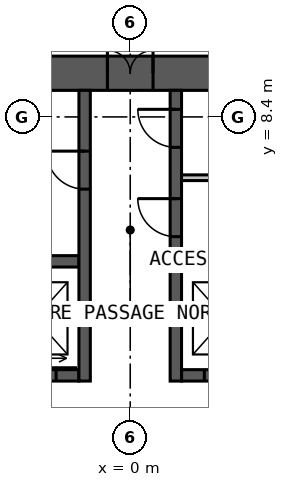
"""IFC4 building model, lengths in metres.
Left out: names, types, materials, properties, quantities, classifications, styles, units other than length and angle.
Written with IfcOpenShell. Run it as: python <this file> out.ifc"""

import sys

from ifc_helpers import new_model, si_unit, direction, frame, frame_2d, origin, place, context, subcontext, project, spatial, rectangle, extrude, element, fill, save


model = new_model("IFC4")
c1 = context("Model", 3, precision=1e-05, world=origin(), true_north=direction((0.0, 1.0)))
c2 = subcontext(c1, "Body", "Model", "MODEL_VIEW")
j1 = project(units=[si_unit("LENGTHUNIT", "METRE"), si_unit("PLANEANGLEUNIT", "RADIAN")], contexts=[c1])
p1 = place(None, origin())
s1 = spatial("IfcSite", under=j1, at=p1, CompositionType="ELEMENT")
p2 = place(p1, origin())
s2 = spatial("IfcBuilding", under=s1, at=p2, CompositionType="ELEMENT")
p3 = place(p2, frame((0.0, 0.0, 16.0)))
s3 = spatial("IfcBuildingStorey", under=s2, at=p3, CompositionType="ELEMENT", Elevation=16.0)
p4 = place(p3, frame((-10.0, 9.55, 0.0), z_axis=(0.0, 0.0, 1.0), x_axis=(1.0, 0.0, 0.0)))
e1 = element("IfcWall", 1, at=p4, inside=s3, PredefinedType="SOLIDWALL", context=c2, shape_type="SweptSolid", body=[
    extrude(rectangle(XDim=20.0, YDim=0.9, at=frame_2d((10.0, 0.0))), origin(), (0.0, 0.0, 1.0), 5.0),
])
p5 = place(p4, frame((9.4, 0.0, 0.0)))
e2 = element("IfcOpeningElement", 2, at=p5, cuts=e1, PredefinedType="OPENING", context=c2, shape_type="SweptSolid", body=[
    extrude(rectangle(XDim=1.2, YDim=2.2, at=frame_2d((0.6, 1.1))), frame((0.0, 0.46, 0.0), z_axis=(0.0, -1.0, 0.0), x_axis=(1.0, 0.0, 0.0)), (0.0, 0.0, 1.0), 0.92),
])
p6 = place(p3, frame((-6.2, 1.6, 0.0), z_axis=(0.0, 0.0, 1.0), x_axis=(1.0, 0.0, 0.0)))
e3 = element("IfcWall", 3, at=p6, inside=s3, PredefinedType="SOLIDWALL", context=c2, shape_type="SweptSolid", body=[
    extrude(rectangle(XDim=4.85, YDim=0.3, at=frame_2d((2.425, 0.0))), origin(), (0.0, 0.0, 1.0), 5.0),
])
p7 = place(p6, frame((0.625, 0.0, 0.0)))
e4 = element("IfcOpeningElement", 4, at=p7, cuts=e3, PredefinedType="OPENING", context=c2, shape_type="SweptSolid", body=[
    extrude(rectangle(XDim=1.1, YDim=2.2, at=frame_2d((0.55, 1.1))), frame((0.0, 0.16, 0.0), z_axis=(0.0, -1.0, 0.0), x_axis=(1.0, 0.0, 0.0)), (0.0, 0.0, 1.0), 0.32),
])
p8 = place(p6, frame((3.15, 0.0, 0.0)))
e5 = element("IfcOpeningElement", 5, at=p8, cuts=e3, PredefinedType="OPENING", context=c2, shape_type="SweptSolid", body=[
    extrude(rectangle(XDim=1.1, YDim=2.2, at=frame_2d((0.55, 1.1))), frame((0.0, 0.16, 0.0), z_axis=(0.0, -1.0, 0.0), x_axis=(1.0, 0.0, 0.0)), (0.0, 0.0, 1.0), 0.32),
])
p9 = place(p3, frame((1.35, 1.6, 0.0), z_axis=(0.0, 0.0, 1.0), x_axis=(1.0, 0.0, 0.0)))
e6 = element("IfcWall", 6, at=p9, inside=s3, PredefinedType="SOLIDWALL", context=c2, shape_type="SweptSolid", body=[
    extrude(rectangle(XDim=4.85, YDim=0.3, at=frame_2d((2.425, 0.0))), origin(), (0.0, 0.0, 1.0), 5.0),
])
p10 = place(p9, frame((0.6, 0.0, 0.0)))
e7 = element("IfcOpeningElement", 7, at=p10, cuts=e6, PredefinedType="OPENING", context=c2, shape_type="SweptSolid", body=[
    extrude(rectangle(XDim=1.1, YDim=2.2, at=frame_2d((0.55, 1.1))), frame((0.0, 0.16, 0.0), z_axis=(0.0, -1.0, 0.0), x_axis=(1.0, 0.0, 0.0)), (0.0, 0.0, 1.0), 0.32),
])
p11 = place(p9, frame((3.125, 0.0, 0.0)))
e8 = element("IfcOpeningElement", 8, at=p11, cuts=e6, PredefinedType="OPENING", context=c2, shape_type="SweptSolid", body=[
    extrude(rectangle(XDim=1.1, YDim=2.2, at=frame_2d((0.55, 1.1))), frame((0.0, 0.16, 0.0), z_axis=(0.0, -1.0, 0.0), x_axis=(1.0, 0.0, 0.0)), (0.0, 0.0, 1.0), 0.32),
])
for number, where, z_axis, x_axis in (
    (9, (-6.2, 4.6, 0.0), (0.0, 0.0, 1.0), (1.0, 0.0, 0.0)),
    (10, (1.35, 4.6, 0.0), (0.0, 0.0, 1.0), (1.0, 0.0, 0.0)),
):
    element("IfcWall", number, at=place(p3, frame(where, z_axis=z_axis, x_axis=x_axis)), inside=s3, PredefinedType="SOLIDWALL", context=c2, shape_type="SweptSolid", body=[
        extrude(rectangle(XDim=4.85, YDim=0.3, at=frame_2d((2.425, 0.0))), origin(), (0.0, 0.0, 1.0), 5.0),
    ])
p12 = place(p3, frame((-1.2, 1.45, 0.0), z_axis=(0.0, 0.0, 1.0), x_axis=(0.0, 1.0, 0.0)))
e11 = element("IfcWall", 11, at=p12, inside=s3, PredefinedType="SOLIDWALL", context=c2, shape_type="SweptSolid", body=[
    extrude(rectangle(XDim=7.65, YDim=0.3, at=frame_2d((3.825, 0.0))), origin(), (0.0, 0.0, 1.0), 5.0),
])
p13 = place(p12, frame((5.05, 0.0, 0.0)))
e12 = element("IfcOpeningElement", 12, at=p13, cuts=e11, PredefinedType="OPENING", context=c2, shape_type="SweptSolid", body=[
    extrude(rectangle(XDim=1.0, YDim=2.2, at=frame_2d((0.5, 1.1))), frame((0.0, 0.16, 0.0), z_axis=(0.0, -1.0, 0.0), x_axis=(1.0, 0.0, 0.0)), (0.0, 0.0, 1.0), 0.32),
])
p14 = place(p3, frame((1.2, 1.45, 0.0), z_axis=(0.0, 0.0, 1.0), x_axis=(0.0, 1.0, 0.0)))
e13 = element("IfcWall", 13, at=p14, inside=s3, PredefinedType="SOLIDWALL", context=c2, shape_type="SweptSolid", body=[
    extrude(rectangle(XDim=7.65, YDim=0.3, at=frame_2d((3.825, 0.0))), origin(), (0.0, 0.0, 1.0), 5.0),
])
p15 = place(p14, frame((3.8, 0.0, 0.0)))
e14 = element("IfcOpeningElement", 14, at=p15, cuts=e13, PredefinedType="OPENING", context=c2, shape_type="SweptSolid", body=[
    extrude(rectangle(XDim=1.0, YDim=2.2, at=frame_2d((0.5, 1.1))), frame((0.0, 0.16, 0.0), z_axis=(0.0, -1.0, 0.0), x_axis=(1.0, 0.0, 0.0)), (0.0, 0.0, 1.0), 0.32),
])
p16 = place(p14, frame((6.15, 0.0, 0.0)))
e15 = element("IfcOpeningElement", 15, at=p16, cuts=e13, PredefinedType="OPENING", context=c2, shape_type="SweptSolid", body=[
    extrude(rectangle(XDim=1.0, YDim=2.2, at=frame_2d((0.5, 1.1))), frame((0.0, 0.16, 0.0), z_axis=(0.0, -1.0, 0.0), x_axis=(1.0, 0.0, 0.0)), (0.0, 0.0, 1.0), 0.32),
])
p17 = place(p3, frame((1.35, 6.8, 0.0), z_axis=(0.0, 0.0, 1.0), x_axis=(1.0, 0.0, 0.0)))
e16 = element("IfcWall", 16, at=p17, inside=s3, PredefinedType="PARTITIONING", context=c2, shape_type="SweptSolid", body=[
    extrude(rectangle(XDim=4.85, YDim=0.15, at=frame_2d((2.425, 0.0))), origin(), (0.0, 0.0, 1.0), 4.75),
])
p18 = place(p17, frame((3.15, 0.0, 0.0)))
e17 = element("IfcOpeningElement", 17, at=p18, cuts=e16, PredefinedType="OPENING", context=c2, shape_type="SweptSolid", body=[
    extrude(rectangle(XDim=0.9, YDim=2.2, at=frame_2d((0.45, 1.1))), frame((0.0, 0.085, 0.0), z_axis=(0.0, -1.0, 0.0), x_axis=(1.0, 0.0, 0.0)), (0.0, 0.0, 1.0), 0.17),
])
p19 = place(p5, origin())
e18 = element("IfcDoor", 18, at=p19, inside=s3, OperationType="DOUBLE_DOOR_SINGLE_SWING", PredefinedType="DOOR", context=c2, shape_type="SweptSolid", body=[
    extrude(rectangle(XDim=1.2, YDim=2.2, at=frame_2d((0.6, 1.1))), frame((0.0, 0.025, 0.0), z_axis=(0.0, -1.0, 0.0), x_axis=(1.0, 0.0, 0.0)), (0.0, 0.0, 1.0), 0.05),
])
fill(e2, e18)
p20 = place(p13, origin())
e19 = element("IfcDoor", 19, at=p20, inside=s3, OperationType="SINGLE_SWING_RIGHT", PredefinedType="DOOR", context=c2, shape_type="SweptSolid", body=[
    extrude(rectangle(XDim=1.0, YDim=2.2, at=frame_2d((0.5, 1.1))), frame((0.0, 0.025, 0.0), z_axis=(0.0, -1.0, 0.0), x_axis=(1.0, 0.0, 0.0)), (0.0, 0.0, 1.0), 0.05),
])
fill(e12, e19)
p21 = place(p15, origin())
e20 = element("IfcDoor", 20, at=p21, inside=s3, OperationType="SINGLE_SWING_RIGHT", PredefinedType="DOOR", context=c2, shape_type="SweptSolid", body=[
    extrude(rectangle(XDim=1.0, YDim=2.2, at=frame_2d((0.5, 1.1))), frame((0.0, 0.025, 0.0), z_axis=(0.0, -1.0, 0.0), x_axis=(1.0, 0.0, 0.0)), (0.0, 0.0, 1.0), 0.05),
])
fill(e14, e20)
p22 = place(p16, origin())
e21 = element("IfcDoor", 21, at=p22, inside=s3, OperationType="SINGLE_SWING_RIGHT", PredefinedType="DOOR", context=c2, shape_type="SweptSolid", body=[
    extrude(rectangle(XDim=1.0, YDim=2.2, at=frame_2d((0.5, 1.1))), frame((0.0, 0.025, 0.0), z_axis=(0.0, -1.0, 0.0), x_axis=(1.0, 0.0, 0.0)), (0.0, 0.0, 1.0), 0.05),
])
fill(e15, e21)
p23 = place(p8, origin())
e22 = element("IfcDoor", 22, at=p23, inside=s3, OperationType="SLIDING_TO_LEFT", PredefinedType="DOOR", context=c2, shape_type="SweptSolid", body=[
    extrude(rectangle(XDim=1.1, YDim=2.2, at=frame_2d((0.55, 1.1))), frame((0.0, 0.025, 0.0), z_axis=(0.0, -1.0, 0.0), x_axis=(1.0, 0.0, 0.0)), (0.0, 0.0, 1.0), 0.05),
])
fill(e5, e22)
p24 = place(p10, origin())
e23 = element("IfcDoor", 23, at=p24, inside=s3, OperationType="SLIDING_TO_LEFT", PredefinedType="DOOR", context=c2, shape_type="SweptSolid", body=[
    extrude(rectangle(XDim=1.1, YDim=2.2, at=frame_2d((0.55, 1.1))), frame((0.0, 0.025, 0.0), z_axis=(0.0, -1.0, 0.0), x_axis=(1.0, 0.0, 0.0)), (0.0, 0.0, 1.0), 0.05),
])
fill(e7, e23)
save(model, sys.argv[1])
